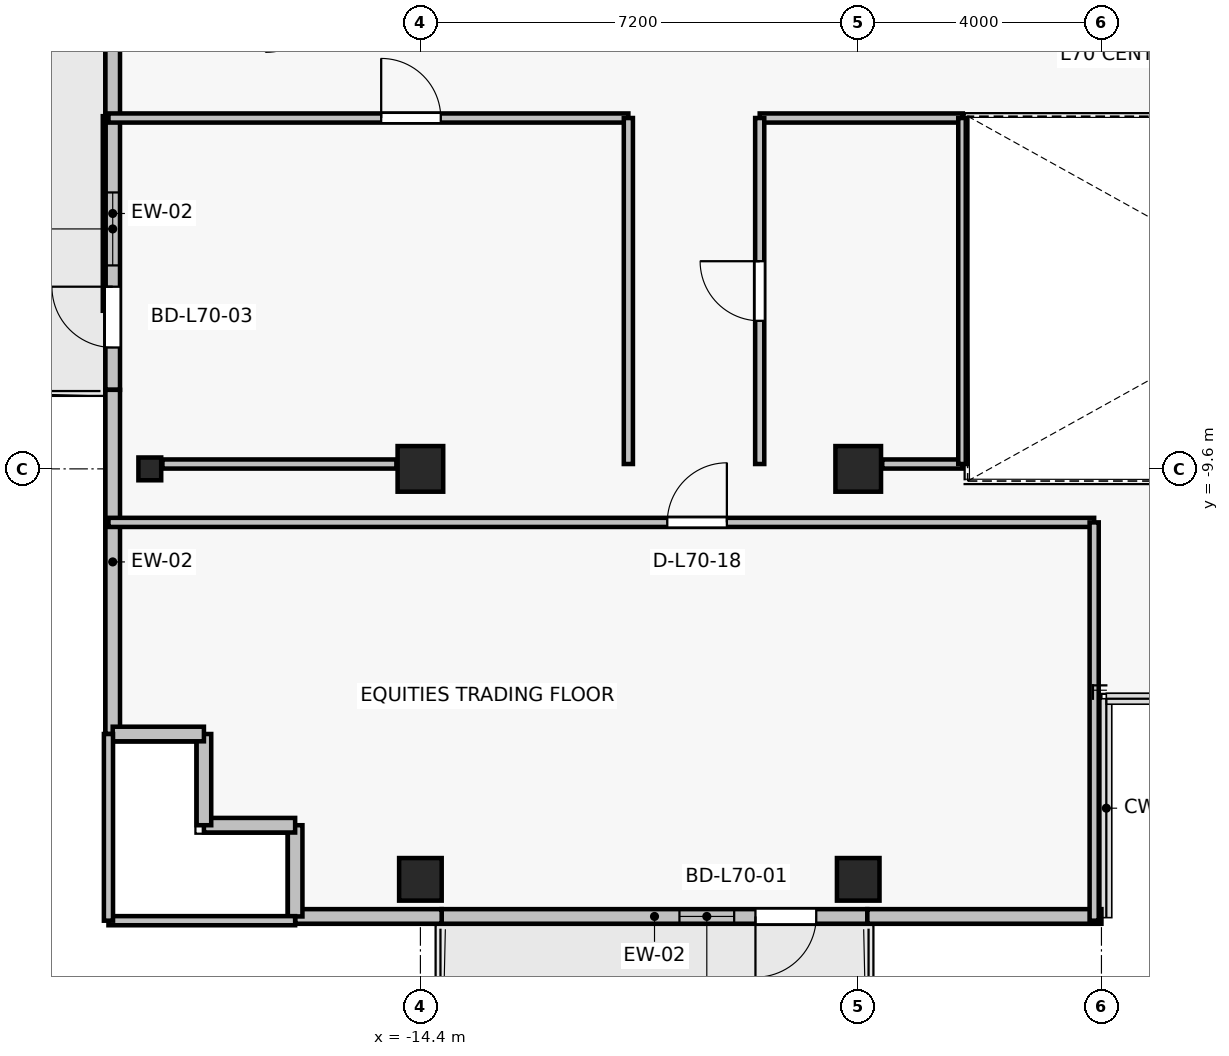
"""IFC4 building model, lengths in metres.
Left out: names, types, materials, properties, quantities, classifications, styles, units other than length and angle.
Written with IfcOpenShell. Run it as: python <this file> out.ifc"""

import sys

from ifc_helpers import new_model, si_unit, direction, frame, frame_2d, origin, origin_2d, place, context, subcontext, project, spatial, rectangle, i_section, extrude, source, transform, mapped, element, fill, save


model = new_model("IFC4")
c1 = context("Model", 3, precision=1e-05, world=origin(), true_north=direction((0.0, 1.0)))
c2 = subcontext(c1, "Body", "Model", "MODEL_VIEW")
j1 = project(units=[si_unit("LENGTHUNIT", "METRE"), si_unit("PLANEANGLEUNIT", "RADIAN")], contexts=[c1])
p1 = place(None, origin())
s1 = spatial("IfcSite", under=j1, at=p1, CompositionType="ELEMENT")
p2 = place(p1, origin())
s2 = spatial("IfcBuilding", under=s1, at=p2, CompositionType="ELEMENT")
p3 = place(p2, frame((0.0, 0.0, 248.5)))
s3 = spatial("IfcBuildingStorey", under=s2, at=p3, CompositionType="ELEMENT", Elevation=248.5)
for number, where, z_axis, x_axis in (
    (1, (-14.4, -9.6, 0.0), (0.0, 0.0, 1.0), (1.0, 0.0, 0.0)),
    (2, (-7.2, -9.6, 0.0), (0.0, 0.0, 1.0), (1.0, 0.0, 0.0)),
):
    element("IfcColumn", number, at=place(p3, frame(where, z_axis=z_axis, x_axis=x_axis)), inside=s3, PredefinedType="COLUMN", context=c2, shape_type="SweptSolid", body=[
        extrude(rectangle(XDim=0.75, YDim=0.75, at=origin_2d()), origin(), (0.0, 0.0, 1.0), 3.3),
    ])
for number, where, z_axis, x_axis in (
    (3, (-14.4, -16.35, 0.0), (0.0, 0.0, 1.0), (1.0, 0.0, 0.0)),
    (4, (-7.2, -16.35, 0.0), (0.0, 0.0, 1.0), (1.0, 0.0, 0.0)),
):
    element("IfcColumn", number, at=place(p3, frame(where, z_axis=z_axis, x_axis=x_axis)), inside=s3, PredefinedType="COLUMN", context=c2, shape_type="SweptSolid", body=[
        extrude(rectangle(XDim=0.7, YDim=0.7, at=origin_2d()), origin(), (0.0, 0.0, 1.0), 3.3),
    ])
p4 = place(p3, frame((-18.85, -9.6, 0.0), z_axis=(0.0, 0.0, 1.0), x_axis=(1.0, 0.0, 0.0)))
e5 = element("IfcColumn", 5, at=p4, inside=s3, PredefinedType="COLUMN", context=c2, shape_type="SweptSolid", body=[
    extrude(i_section(OverallWidth=0.375, OverallDepth=0.375, WebThickness=0.017, FlangeThickness=0.027, FilletRadius=0.015, at=origin_2d()), origin(), (0.0, 0.0, 1.0), 3.3),
])
p5 = place(p3, frame((-7.05, -16.96, 0.0), z_axis=(0.0, 0.0, 1.0), x_axis=(-1.0, 0.0, 0.0)))
e6 = element("IfcWall", 6, at=p5, inside=s3, PredefinedType="SOLIDWALL", context=c2, shape_type="SweptSolid", body=[
    extrude(rectangle(XDim=7.0, YDim=0.24, at=frame_2d((3.5, 0.0))), origin(), (0.0, 0.0, 1.0), 2.665),
])
p6 = place(p5, frame((0.84, 0.0, 0.0)))
e7 = element("IfcOpeningElement", 7, at=p6, cuts=e6, PredefinedType="OPENING", context=c2, shape_type="SweptSolid", body=[
    extrude(rectangle(XDim=1.0, YDim=2.2, at=frame_2d((0.5, 1.1))), frame((0.0, 0.13, 0.0), z_axis=(0.0, -1.0, 0.0), x_axis=(1.0, 0.0, 0.0)), (0.0, 0.0, 1.0), 0.26),
])
p7 = place(p5, frame((2.19, 0.0, 0.85)))
e8 = element("IfcOpeningElement", 8, at=p7, cuts=e6, PredefinedType="OPENING", context=c2, shape_type="SweptSolid", body=[
    extrude(rectangle(XDim=0.9, YDim=1.35, at=frame_2d((0.45, 0.675))), frame((0.0, 0.13, 0.0), z_axis=(0.0, -1.0, 0.0), x_axis=(1.0, 0.0, 0.0)), (0.0, 0.0, 1.0), 0.26),
])
p8 = place(p3, frame((-19.46, -8.3, 0.0), z_axis=(0.0, 0.0, 1.0), x_axis=(0.0, 1.0, 0.0)))
e9 = element("IfcWall", 9, at=p8, inside=s3, PredefinedType="SOLIDWALL", context=c2, shape_type="SweptSolid", body=[
    extrude(rectangle(XDim=5.8, YDim=0.24, at=frame_2d((2.9, 0.0))), origin(), (0.0, 0.0, 1.0), 3.075),
])
p9 = place(p8, frame((0.696, 0.0, 0.0)))
e10 = element("IfcOpeningElement", 10, at=p9, cuts=e9, PredefinedType="OPENING", context=c2, shape_type="SweptSolid", body=[
    extrude(rectangle(XDim=1.0, YDim=2.2, at=frame_2d((0.5, 1.1))), frame((0.0, 0.13, 0.0), z_axis=(0.0, -1.0, 0.0), x_axis=(1.0, 0.0, 0.0)), (0.0, 0.0, 1.0), 0.26),
])
p10 = place(p8, frame((2.046, 0.0, 0.85)))
e11 = element("IfcOpeningElement", 11, at=p10, cuts=e9, PredefinedType="OPENING", context=c2, shape_type="SweptSolid", body=[
    extrude(rectangle(XDim=1.2, YDim=1.5, at=frame_2d((0.6, 0.75))), frame((0.0, 0.13, 0.0), z_axis=(0.0, -1.0, 0.0), x_axis=(1.0, 0.0, 0.0)), (0.0, 0.0, 1.0), 0.26),
])
p11 = place(p3, frame((-19.46, -8.3, 0.0), z_axis=(0.0, 0.0, 1.0), x_axis=(0.0, -1.0, 0.0)))
e12 = element("IfcWall", 12, at=p11, inside=s3, PredefinedType="SOLIDWALL", context=c2, shape_type="SweptSolid", body=[
    extrude(rectangle(XDim=5.66, YDim=0.24, at=frame_2d((2.83, 0.0))), origin(), (0.0, 0.0, 1.0), 3.075),
])
p12 = place(p3, frame((-7.05, -16.96, 0.0), z_axis=(0.0, 0.0, 1.0), x_axis=(1.0, 0.0, 0.0)))
e13 = element("IfcWall", 13, at=p12, inside=s3, PredefinedType="SOLIDWALL", context=c2, shape_type="SweptSolid", body=[
    extrude(rectangle(XDim=3.85, YDim=0.24, at=frame_2d((1.925, 0.0))), origin(), (0.0, 0.0, 1.0), 3.075),
])
p13 = place(p3, frame((-16.46, -16.96, 0.0), z_axis=(0.0, 0.0, 1.0), x_axis=(1.0, 0.0, 0.0)))
e14 = element("IfcWall", 14, at=p13, inside=s3, PredefinedType="SOLIDWALL", context=c2, shape_type="SweptSolid", body=[
    extrude(rectangle(XDim=2.41, YDim=0.24, at=frame_2d((1.205, 0.0))), origin(), (0.0, 0.0, 1.0), 3.075),
])
for number, where, z_axis, x_axis in (
    (15, (-16.46, -15.46, 0.0), (0.0, 0.0, 1.0), (0.0, -1.0, 0.0)),
    (16, (-17.96, -15.46, 0.0), (0.0, 0.0, 1.0), (1.0, 0.0, 0.0)),
    (17, (-17.96, -13.96, 0.0), (0.0, 0.0, 1.0), (0.0, -1.0, 0.0)),
    (18, (-19.46, -13.96, 0.0), (0.0, 0.0, 1.0), (1.0, 0.0, 0.0)),
):
    element("IfcWall", number, at=place(p3, frame(where, z_axis=z_axis, x_axis=x_axis)), inside=s3, PredefinedType="SOLIDWALL", context=c2, shape_type="SweptSolid", body=[
        extrude(rectangle(XDim=1.5, YDim=0.24, at=frame_2d((0.75, 0.0))), origin(), (0.0, 0.0, 1.0), 3.075),
    ])
p14 = place(p3, frame((-14.795, -9.52, 0.0), z_axis=(0.0, 0.0, 1.0), x_axis=(-1.0, 0.0, 0.0)))
e19 = element("IfcWall", 19, at=p14, inside=s3, PredefinedType="PARTITIONING", context=c2, shape_type="SweptSolid", body=[
    extrude(rectangle(XDim=3.848, YDim=0.15, at=frame_2d((1.924, 0.0))), origin(), (0.0, 0.0, 1.0), 2.615),
])
p15 = place(p3, frame((-19.53, -3.83, 0.0), z_axis=(0.0, 0.0, 1.0), x_axis=(1.0, 0.0, 0.0)))
e20 = element("IfcWall", 20, at=p15, inside=s3, PredefinedType="PARTITIONING", context=c2, shape_type="SweptSolid", body=[
    extrude(rectangle(XDim=8.55, YDim=0.15, at=frame_2d((4.275, 0.0))), origin(), (0.0, 0.0, 1.0), 2.615),
])
p16 = place(p15, frame((4.485, 0.0, 0.0)))
e21 = element("IfcOpeningElement", 21, at=p16, cuts=e20, PredefinedType="OPENING", context=c2, shape_type="SweptSolid", body=[
    extrude(rectangle(XDim=0.98, YDim=2.15, at=frame_2d((0.49, 1.075))), frame((0.0, 0.085, 0.0), z_axis=(0.0, -1.0, 0.0), x_axis=(1.0, 0.0, 0.0)), (0.0, 0.0, 1.0), 0.17),
])
p17 = place(p3, frame((-10.98, -3.83, 0.0), z_axis=(0.0, 0.0, 1.0), x_axis=(0.0, -1.0, 0.0)))
e22 = element("IfcWall", 22, at=p17, inside=s3, PredefinedType="PARTITIONING", context=c2, shape_type="SweptSolid", body=[
    extrude(rectangle(XDim=5.69, YDim=0.15, at=frame_2d((2.845, 0.0))), origin(), (0.0, 0.0, 1.0), 2.615),
])
p18 = place(p3, frame((-16.46, -17.03, 0.0), z_axis=(0.0, 0.0, 1.0), x_axis=(-1.0, 0.0, 0.0)))
e23 = element("IfcWall", 23, at=p18, inside=s3, PredefinedType="PARTITIONING", context=c2, shape_type="SweptSolid", body=[
    extrude(rectangle(XDim=3.07, YDim=0.15, at=frame_2d((1.535, 0.0))), origin(), (0.0, 0.0, 1.0), 2.665),
])
p19 = place(p3, frame((-19.53, -10.48, 0.0), z_axis=(0.0, 0.0, 1.0), x_axis=(1.0, 0.0, 0.0)))
e24 = element("IfcWall", 24, at=p19, inside=s3, PredefinedType="PARTITIONING", context=c2, shape_type="SweptSolid", body=[
    extrude(rectangle(XDim=16.21, YDim=0.15, at=frame_2d((8.105, 0.0))), origin(), (0.0, 0.0, 1.0), 2.615),
])
p20 = place(p19, frame((9.19, 0.0, 0.0)))
e25 = element("IfcOpeningElement", 25, at=p20, cuts=e24, PredefinedType="OPENING", context=c2, shape_type="SweptSolid", body=[
    extrude(rectangle(XDim=0.98, YDim=2.15, at=frame_2d((0.49, 1.075))), frame((0.0, 0.085, 0.0), z_axis=(0.0, -1.0, 0.0), x_axis=(1.0, 0.0, 0.0)), (0.0, 0.0, 1.0), 0.17),
])
p21 = place(p3, frame((-19.53, -17.03, 0.0), z_axis=(0.0, 0.0, 1.0), x_axis=(0.0, 1.0, 0.0)))
e26 = element("IfcWall", 26, at=p21, inside=s3, PredefinedType="PARTITIONING", context=c2, shape_type="SweptSolid", body=[
    extrude(rectangle(XDim=3.07, YDim=0.15, at=frame_2d((1.535, 0.0))), origin(), (0.0, 0.0, 1.0), 3.075),
])
p22 = place(p3, frame((-3.32, -10.48, 0.0), z_axis=(0.0, 0.0, 1.0), x_axis=(0.0, -1.0, 0.0)))
e27 = element("IfcWall", 27, at=p22, inside=s3, PredefinedType="PARTITIONING", context=c2, shape_type="SweptSolid", body=[
    extrude(rectangle(XDim=6.55, YDim=0.15, at=frame_2d((3.275, 0.0))), origin(), (0.0, 0.0, 1.0), 2.615),
])
p23 = place(p3, frame((-5.48, -9.52, 0.0), z_axis=(0.0, 0.0, 1.0), x_axis=(-1.0, 0.0, 0.0)))
e28 = element("IfcWall", 28, at=p23, inside=s3, PredefinedType="PARTITIONING", context=c2, shape_type="SweptSolid", body=[
    extrude(rectangle(XDim=1.325, YDim=0.15, at=frame_2d((0.663, 0.0))), origin(), (0.0, 0.0, 1.0), 2.615),
])
p24 = place(p3, frame((-8.82, -3.83, 0.0), z_axis=(0.0, 0.0, 1.0), x_axis=(1.0, 0.0, 0.0)))
e29 = element("IfcWall", 29, at=p24, inside=s3, PredefinedType="PARTITIONING", context=c2, shape_type="SweptSolid", body=[
    extrude(rectangle(XDim=3.34, YDim=0.15, at=frame_2d((1.67, 0.0))), origin(), (0.0, 0.0, 1.0), 2.615),
])
p25 = place(p3, frame((-8.82, -9.52, 0.0), z_axis=(0.0, 0.0, 1.0), x_axis=(0.0, 1.0, 0.0)))
e30 = element("IfcWall", 30, at=p25, inside=s3, PredefinedType="PARTITIONING", context=c2, shape_type="SweptSolid", body=[
    extrude(rectangle(XDim=5.69, YDim=0.15, at=frame_2d((2.845, 0.0))), origin(), (0.0, 0.0, 1.0), 2.615),
])
p26 = place(p25, frame((2.355, 0.0, 0.0)))
e31 = element("IfcOpeningElement", 31, at=p26, cuts=e30, PredefinedType="OPENING", context=c2, shape_type="SweptSolid", body=[
    extrude(rectangle(XDim=0.98, YDim=2.15, at=frame_2d((0.49, 1.075))), frame((0.0, 0.085, 0.0), z_axis=(0.0, -1.0, 0.0), x_axis=(1.0, 0.0, 0.0)), (0.0, 0.0, 1.0), 0.17),
])
p27 = place(p3, frame((-5.48, -3.83, 0.0), z_axis=(0.0, 0.0, 1.0), x_axis=(0.0, -1.0, 0.0)))
e32 = element("IfcWall", 32, at=p27, inside=s3, PredefinedType="PARTITIONING", context=c2, shape_type="SweptSolid", body=[
    extrude(rectangle(XDim=5.69, YDim=0.15, at=frame_2d((2.845, 0.0))), origin(), (0.0, 0.0, 1.0), 2.615),
])
m1 = source(origin(), c2, "Body", "SweptSolid", [
    extrude(rectangle(XDim=1.0, YDim=2.2, at=frame_2d((0.5, 1.1))), frame((0.0, 0.025, 0.0), z_axis=(0.0, -1.0, 0.0), x_axis=(1.0, 0.0, 0.0)), (0.0, 0.0, 1.0), 0.05),
])
p28 = place(p6, origin())
e33 = element("IfcDoor", 33, at=p28, inside=s3, OperationType="SINGLE_SWING_RIGHT", PredefinedType="DOOR", context=c2, shape_type="MappedRepresentation", body=[
    mapped(m1, transform((0.0, 0.0, 0.0), x_axis=(1.0, 0.0, 0.0), y_axis=(0.0, 1.0, 0.0), z_axis=(0.0, 0.0, 1.0), scale=1.0)),
])
fill(e7, e33)
m2 = source(origin(), c2, "Body", "SweptSolid", [
    extrude(rectangle(XDim=0.9, YDim=1.35, at=frame_2d((0.45, 0.675))), frame((0.0, 0.03, 0.0), z_axis=(0.0, -1.0, 0.0), x_axis=(1.0, 0.0, 0.0)), (0.0, 0.0, 1.0), 0.06),
])
p29 = place(p7, origin())
e34 = element("IfcWindow", 34, at=p29, inside=s3, PartitioningType="SINGLE_PANEL", PredefinedType="WINDOW", context=c2, shape_type="MappedRepresentation", body=[
    mapped(m2, transform((0.0, 0.0, 0.0), x_axis=(1.0, 0.0, 0.0), y_axis=(0.0, 1.0, 0.0), z_axis=(0.0, 0.0, 1.0), scale=1.0)),
])
fill(e8, e34)
p30 = place(p9, origin())
e35 = element("IfcDoor", 35, at=p30, inside=s3, OperationType="SINGLE_SWING_RIGHT", PredefinedType="DOOR", context=c2, shape_type="MappedRepresentation", body=[
    mapped(m1, transform((0.0, 0.0, 0.0), x_axis=(1.0, 0.0, 0.0), y_axis=(0.0, 1.0, 0.0), z_axis=(0.0, 0.0, 1.0), scale=1.0)),
])
fill(e10, e35)
m3 = source(origin(), c2, "Body", "SweptSolid", [
    extrude(rectangle(XDim=1.2, YDim=1.5, at=frame_2d((0.6, 0.75))), frame((0.0, 0.03, 0.0), z_axis=(0.0, -1.0, 0.0), x_axis=(1.0, 0.0, 0.0)), (0.0, 0.0, 1.0), 0.06),
])
p31 = place(p10, origin())
e36 = element("IfcWindow", 36, at=p31, inside=s3, PartitioningType="SINGLE_PANEL", PredefinedType="WINDOW", context=c2, shape_type="MappedRepresentation", body=[
    mapped(m3, transform((0.0, 0.0, 0.0), x_axis=(1.0, 0.0, 0.0), y_axis=(0.0, 1.0, 0.0), z_axis=(0.0, 0.0, 1.0), scale=1.0)),
])
fill(e11, e36)
m4 = source(origin(), c2, "Body", "SweptSolid", [
    extrude(rectangle(XDim=0.98, YDim=2.15, at=frame_2d((0.49, 1.075))), frame((0.0, 0.025, 0.0), z_axis=(0.0, -1.0, 0.0), x_axis=(1.0, 0.0, 0.0)), (0.0, 0.0, 1.0), 0.05),
])
p32 = place(p16, origin())
e37 = element("IfcDoor", 37, at=p32, inside=s3, OperationType="SINGLE_SWING_LEFT", PredefinedType="DOOR", context=c2, shape_type="MappedRepresentation", body=[
    mapped(m4, transform((0.0, 0.0, 0.0), x_axis=(1.0, 0.0, 0.0), y_axis=(0.0, 1.0, 0.0), z_axis=(0.0, 0.0, 1.0), scale=1.0)),
])
fill(e21, e37)
p33 = place(p20, origin())
e38 = element("IfcDoor", 38, at=p33, inside=s3, OperationType="SINGLE_SWING_RIGHT", PredefinedType="DOOR", context=c2, shape_type="MappedRepresentation", body=[
    mapped(m4, transform((0.0, 0.0, 0.0), x_axis=(1.0, 0.0, 0.0), y_axis=(0.0, 1.0, 0.0), z_axis=(0.0, 0.0, 1.0), scale=1.0)),
])
fill(e25, e38)
p34 = place(p26, origin())
e39 = element("IfcDoor", 39, at=p34, inside=s3, OperationType="SINGLE_SWING_RIGHT", PredefinedType="DOOR", context=c2, shape_type="MappedRepresentation", body=[
    mapped(m4, transform((0.0, 0.0, 0.0), x_axis=(1.0, 0.0, 0.0), y_axis=(0.0, 1.0, 0.0), z_axis=(0.0, 0.0, 1.0), scale=1.0)),
])
fill(e31, e39)
save(model, sys.argv[1])
